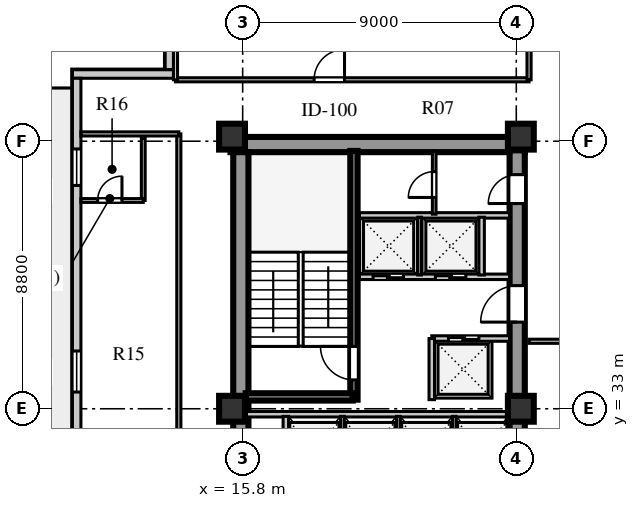
"""IFC4 building model, lengths in metres.
Left out: names, types, materials, properties, quantities, classifications, styles, units other than length and angle.
Written with IfcOpenShell. Run it as: python <this file> out.ifc"""

import sys

from ifc_helpers import new_model, si_unit, direction, frame, frame_2d, origin, origin_2d, place, context, subcontext, project, spatial, rectangle, extrude, element, fill, save


model = new_model("IFC4")
c1 = context("Model", 3, precision=1e-05, world=origin(), true_north=direction((0.0, 1.0)))
c2 = subcontext(c1, "Body", "Model", "MODEL_VIEW")
j1 = project(units=[si_unit("LENGTHUNIT", "METRE"), si_unit("PLANEANGLEUNIT", "RADIAN")], contexts=[c1])
p1 = place(None, origin())
s1 = spatial("IfcSite", under=j1, at=p1, CompositionType="ELEMENT")
p2 = place(p1, origin())
s2 = spatial("IfcBuilding", under=s1, at=p2, CompositionType="ELEMENT")
p3 = place(p2, frame((0.0, 0.0, 119.4)))
s3 = spatial("IfcBuildingStorey", under=s2, at=p3, CompositionType="ELEMENT", Elevation=119.4)
p4 = place(p3, frame((15.4, 41.69, 0.0), z_axis=(0.0, 0.0, 1.0), x_axis=(1.0, 0.0, 0.0)))
e1 = element("IfcWall", 1, at=p4, inside=s3, PredefinedType="SHEAR", context=c2, shape_type="SweptSolid", body=[
    extrude(rectangle(XDim=9.68, YDim=0.5, at=frame_2d((4.84, 0.0))), origin(), (0.0, 0.0, 1.0), 3.6),
])
p5 = place(p3, frame((15.74, 15.81, 0.0), z_axis=(0.0, 0.0, 1.0), x_axis=(0.0, 1.0, 0.0)))
e2 = element("IfcWall", 2, at=p5, inside=s3, PredefinedType="SHEAR", context=c2, shape_type="SweptSolid", body=[
    extrude(rectangle(XDim=25.63, YDim=0.5, at=frame_2d((12.815, 0.0))), origin(), (0.0, 0.0, 1.0), 3.6),
])
p6 = place(p3, frame((24.83, 15.74, 0.0), z_axis=(0.0, 0.0, 1.0), x_axis=(0.0, 1.0, 0.0)))
e3 = element("IfcWall", 3, at=p6, inside=s3, PredefinedType="SHEAR", context=c2, shape_type="SweptSolid", body=[
    extrude(rectangle(XDim=25.76, YDim=0.5, at=frame_2d((12.88, 0.0))), origin(), (0.0, 0.0, 1.0), 3.6),
])
p7 = place(p6, frame((1.61, 0.0, 0.0)))
e4 = element("IfcOpeningElement", 4, at=p7, cuts=e3, PredefinedType="OPENING", context=c2, shape_type="SweptSolid", body=[
    extrude(rectangle(XDim=1.2, YDim=2.1, at=frame_2d((0.6, 1.05))), frame((0.0, 0.26, 0.0), z_axis=(0.0, -1.0, 0.0), x_axis=(1.0, 0.0, 0.0)), (0.0, 0.0, 1.0), 0.52),
])
p8 = place(p6, frame((6.78, 0.0, 0.0)))
e5 = element("IfcOpeningElement", 5, at=p8, cuts=e3, PredefinedType="OPENING", context=c2, shape_type="SweptSolid", body=[
    extrude(rectangle(XDim=0.85, YDim=2.06, at=frame_2d((0.425, 1.03))), frame((0.0, 0.26, 0.0), z_axis=(0.0, -1.0, 0.0), x_axis=(1.0, 0.0, 0.0)), (0.0, 0.0, 1.0), 0.52),
])
p9 = place(p6, frame((12.11, 0.0, 0.0)))
e6 = element("IfcOpeningElement", 6, at=p9, cuts=e3, PredefinedType="OPENING", context=c2, shape_type="SweptSolid", body=[
    extrude(rectangle(XDim=1.5, YDim=2.12, at=frame_2d((0.75, 1.06))), frame((0.0, 0.26, 0.0), z_axis=(0.0, -1.0, 0.0), x_axis=(1.0, 0.0, 0.0)), (0.0, 0.0, 1.0), 0.52),
])
p10 = place(p6, frame((20.11, 0.0, 0.0)))
e7 = element("IfcOpeningElement", 7, at=p10, cuts=e3, PredefinedType="OPENING", context=c2, shape_type="SweptSolid", body=[
    extrude(rectangle(XDim=1.2, YDim=2.12, at=frame_2d((0.6, 1.06))), frame((0.0, 0.26, 0.0), z_axis=(0.0, -1.0, 0.0), x_axis=(1.0, 0.0, 0.0)), (0.0, 0.0, 1.0), 0.52),
])
p11 = place(p6, frame((24.01, 0.0, 0.0)))
e8 = element("IfcOpeningElement", 8, at=p11, cuts=e3, PredefinedType="OPENING", context=c2, shape_type="SweptSolid", body=[
    extrude(rectangle(XDim=0.95, YDim=2.1, at=frame_2d((0.475, 1.05))), frame((0.0, 0.26, 0.0), z_axis=(0.0, -1.0, 0.0), x_axis=(1.0, 0.0, 0.0)), (0.0, 0.0, 1.0), 0.52),
])
for number, where, z_axis, x_axis in (
    (9, (15.45, 33.0, 0.0), (0.0, 0.0, 1.0), (1.0, 0.0, 0.0)),
    (10, (15.45, 41.95, 0.0), (0.0, 0.0, 1.0), (1.0, 0.0, 0.0)),
    (11, (24.95, 33.0, 0.0), (0.0, 0.0, 1.0), (1.0, 0.0, 0.0)),
    (12, (24.95, 41.95, 0.0), (0.0, 0.0, 1.0), (1.0, 0.0, 0.0)),
):
    element("IfcColumn", number, at=place(p3, frame(where, z_axis=z_axis, x_axis=x_axis)), inside=s3, PredefinedType="COLUMN", context=c2, shape_type="SweptSolid", body=[
        extrude(rectangle(XDim=0.85, YDim=0.85, at=origin_2d()), origin(), (0.0, 0.0, 1.0), 3.6),
    ])
p12 = place(p3, frame((13.39, 46.92, 0.0), z_axis=(0.0, 0.0, 1.0), x_axis=(0.0, -1.0, 0.0)))
e13 = element("IfcWall", 13, at=p12, inside=s3, PredefinedType="STANDARD", context=c2, shape_type="SweptSolid", body=[
    extrude(rectangle(XDim=2.77, YDim=0.28, at=frame_2d((1.385, 0.0))), origin(), (0.0, 0.0, 1.0), 3.6),
])
p13 = place(p3, frame((13.53, 44.01, 0.0), z_axis=(0.0, 0.0, 1.0), x_axis=(-1.0, 0.0, 0.0)))
e14 = element("IfcWall", 14, at=p13, inside=s3, PredefinedType="STANDARD", context=c2, shape_type="SweptSolid", body=[
    extrude(rectangle(XDim=3.33, YDim=0.28, at=frame_2d((1.665, 0.0))), origin(), (0.0, 0.0, 1.0), 3.6),
])
p14 = place(p3, frame((10.34, 43.87, 0.0), z_axis=(0.0, 0.0, 1.0), x_axis=(0.0, -1.0, 0.0)))
e15 = element("IfcWall", 15, at=p14, inside=s3, PredefinedType="STANDARD", context=c2, shape_type="SweptSolid", body=[
    extrude(rectangle(XDim=30.54, YDim=0.28, at=frame_2d((15.27, 0.0))), origin(), (0.0, 0.0, 1.0), 3.6),
])
p15 = place(p14, frame((27.22, 0.0, 0.0)))
e16 = element("IfcOpeningElement", 16, at=p15, cuts=e15, PredefinedType="OPENING", context=c2, shape_type="SweptSolid", body=[
    extrude(rectangle(XDim=1.0, YDim=2.05, at=frame_2d((0.5, 1.025))), frame((0.0, 0.15, 0.0), z_axis=(0.0, -1.0, 0.0), x_axis=(1.0, 0.0, 0.0)), (0.0, 0.0, 1.0), 0.3),
])
p16 = place(p14, frame((21.08, 0.0, 0.8)))
e17 = element("IfcOpeningElement", 17, at=p16, cuts=e15, PredefinedType="OPENING", context=c2, shape_type="SweptSolid", body=[
    extrude(rectangle(XDim=2.4, YDim=2.05, at=frame_2d((1.2, 1.025))), frame((0.0, 0.15, 0.0), z_axis=(0.0, -1.0, 0.0), x_axis=(1.0, 0.0, 0.0)), (0.0, 0.0, 1.0), 0.3),
])
p17 = place(p14, frame((15.735, 0.0, 0.8)))
e18 = element("IfcOpeningElement", 18, at=p17, cuts=e15, PredefinedType="OPENING", context=c2, shape_type="SweptSolid", body=[
    extrude(rectangle(XDim=1.2, YDim=1.75, at=frame_2d((0.6, 0.875))), frame((0.0, 0.15, 0.0), z_axis=(0.0, -1.0, 0.0), x_axis=(1.0, 0.0, 0.0)), (0.0, 0.0, 1.0), 0.3),
])
p18 = place(p14, frame((8.97, 0.0, 0.8)))
e19 = element("IfcOpeningElement", 19, at=p18, cuts=e15, PredefinedType="OPENING", context=c2, shape_type="SweptSolid", body=[
    extrude(rectangle(XDim=1.35, YDim=1.9, at=frame_2d((0.675, 0.95))), frame((0.0, 0.15, 0.0), z_axis=(0.0, -1.0, 0.0), x_axis=(1.0, 0.0, 0.0)), (0.0, 0.0, 1.0), 0.3),
])
p19 = place(p14, frame((2.325, 0.0, 0.8)))
e20 = element("IfcOpeningElement", 20, at=p19, cuts=e15, PredefinedType="OPENING", context=c2, shape_type="SweptSolid", body=[
    extrude(rectangle(XDim=1.2, YDim=1.75, at=frame_2d((0.6, 0.875))), frame((0.0, 0.15, 0.0), z_axis=(0.0, -1.0, 0.0), x_axis=(1.0, 0.0, 0.0)), (0.0, 0.0, 1.0), 0.3),
])
p20 = place(p3, frame((15.9, 32.82, 0.0), z_axis=(0.0, 0.0, 1.0), x_axis=(1.0, 0.0, 0.0)))
e21 = element("IfcWall", 21, at=p20, inside=s3, PredefinedType="SOLIDWALL", context=c2, shape_type="SweptSolid", body=[
    extrude(rectangle(XDim=8.68, YDim=0.18, at=frame_2d((4.34, 0.0))), origin(), (0.0, 0.0, 1.0), 2.95),
])
p21 = place(p3, frame((17.22, 30.7, 0.0), z_axis=(0.0, 0.0, 1.0), x_axis=(0.0, 1.0, 0.0)))
e22 = element("IfcWall", 22, at=p21, inside=s3, PredefinedType="SOLIDWALL", context=c2, shape_type="SweptSolid", body=[
    extrude(rectangle(XDim=2.05, YDim=0.18, at=frame_2d((1.025, 0.0))), origin(), (0.0, 0.0, 1.0), 3.6),
])
for number, where, z_axis, x_axis in (
    (23, (19.08, 30.7, 0.0), (0.0, 0.0, 1.0), (0.0, 1.0, 0.0)),
    (24, (20.92, 30.7, 0.0), (0.0, 0.0, 1.0), (0.0, 1.0, 0.0)),
    (25, (22.76, 30.7, 0.0), (0.0, 0.0, 1.0), (0.0, 1.0, 0.0)),
):
    element("IfcWall", number, at=place(p3, frame(where, z_axis=z_axis, x_axis=x_axis)), inside=s3, PredefinedType="PARTITIONING", context=c2, shape_type="SweptSolid", body=[
        extrude(rectangle(XDim=2.05, YDim=0.12, at=frame_2d((1.025, 0.0))), origin(), (0.0, 0.0, 1.0), 3.6),
    ])
p22 = place(p3, frame((19.46, 33.3, 0.0), z_axis=(0.0, 0.0, 1.0), x_axis=(0.0, 1.0, 0.0)))
e26 = element("IfcWall", 26, at=p22, inside=s3, PredefinedType="SHEAR", context=c2, shape_type="SweptSolid", body=[
    extrude(rectangle(XDim=8.18, YDim=0.24, at=frame_2d((4.09, 0.0))), origin(), (0.0, 0.0, 1.0), 3.85),
])
p23 = place(p22, frame((0.65, 0.0, 0.0)))
e27 = element("IfcOpeningElement", 27, at=p23, cuts=e26, PredefinedType="OPENING", context=c2, shape_type="SweptSolid", body=[
    extrude(rectangle(XDim=1.1, YDim=2.1, at=frame_2d((0.55, 1.05))), frame((0.0, 0.13, 0.0), z_axis=(0.0, -1.0, 0.0), x_axis=(1.0, 0.0, 0.0)), (0.0, 0.0, 1.0), 0.26),
])
p24 = place(p3, frame((15.9, 33.39, 0.0), z_axis=(0.0, 0.0, 1.0), x_axis=(1.0, 0.0, 0.0)))
e28 = element("IfcWall", 28, at=p24, inside=s3, PredefinedType="SHEAR", context=c2, shape_type="SweptSolid", body=[
    extrude(rectangle(XDim=3.52, YDim=0.24, at=frame_2d((1.76, 0.0))), origin(), (0.0, 0.0, 1.0), 3.85),
])
p25 = place(p3, frame((22.02, 35.31, 0.0), z_axis=(0.0, 0.0, 1.0), x_axis=(1.0, 0.0, 0.0)))
e29 = element("IfcWall", 29, at=p25, inside=s3, PredefinedType="SOLIDWALL", context=c2, shape_type="SweptSolid", body=[
    extrude(rectangle(XDim=2.56, YDim=0.18, at=frame_2d((1.28, 0.0))), origin(), (0.0, 0.0, 1.0), 3.6),
])
p26 = place(p25, frame((0.55, 0.0, 0.0)))
e30 = element("IfcOpeningElement", 30, at=p26, cuts=e29, PredefinedType="OPENING", context=c2, shape_type="SweptSolid", body=[
    extrude(rectangle(XDim=1.0, YDim=2.1, at=frame_2d((0.5, 1.05))), frame((0.0, 0.1, 0.0), z_axis=(0.0, -1.0, 0.0), x_axis=(1.0, 0.0, 0.0)), (0.0, 0.0, 1.0), 0.2),
])
p27 = place(p3, frame((22.02, 33.3, 0.0), z_axis=(0.0, 0.0, 1.0), x_axis=(0.0, 1.0, 0.0)))
e31 = element("IfcWall", 31, at=p27, inside=s3, PredefinedType="SOLIDWALL", context=c2, shape_type="SweptSolid", body=[
    extrude(rectangle(XDim=2.01, YDim=0.18, at=frame_2d((1.005, 0.0))), origin(), (0.0, 0.0, 1.0), 3.6),
])
p28 = place(p3, frame((19.64, 37.34, 0.0), z_axis=(0.0, 0.0, 1.0), x_axis=(1.0, 0.0, 0.0)))
e32 = element("IfcWall", 32, at=p28, inside=s3, PredefinedType="SOLIDWALL", context=c2, shape_type="SweptSolid", body=[
    extrude(rectangle(XDim=4.94, YDim=0.18, at=frame_2d((2.47, 0.0))), origin(), (0.0, 0.0, 1.0), 3.6),
])
p29 = place(p28, frame((0.45, 0.0, 0.0)))
e33 = element("IfcOpeningElement", 33, at=p29, cuts=e32, PredefinedType="OPENING", context=c2, shape_type="SweptSolid", body=[
    extrude(rectangle(XDim=1.0, YDim=2.1, at=frame_2d((0.5, 1.05))), frame((0.0, 0.1, 0.0), z_axis=(0.0, -1.0, 0.0), x_axis=(1.0, 0.0, 0.0)), (0.0, 0.0, 1.0), 0.2),
])
p30 = place(p28, frame((2.5, 0.0, 0.0)))
e34 = element("IfcOpeningElement", 34, at=p30, cuts=e32, PredefinedType="OPENING", context=c2, shape_type="SweptSolid", body=[
    extrude(rectangle(XDim=1.0, YDim=2.1, at=frame_2d((0.5, 1.05))), frame((0.0, 0.1, 0.0), z_axis=(0.0, -1.0, 0.0), x_axis=(1.0, 0.0, 0.0)), (0.0, 0.0, 1.0), 0.2),
])
p31 = place(p3, frame((19.64, 39.36, 0.0), z_axis=(0.0, 0.0, 1.0), x_axis=(1.0, 0.0, 0.0)))
e35 = element("IfcWall", 35, at=p31, inside=s3, PredefinedType="SOLIDWALL", context=c2, shape_type="SweptSolid", body=[
    extrude(rectangle(XDim=4.94, YDim=0.18, at=frame_2d((2.47, 0.0))), origin(), (0.0, 0.0, 1.0), 3.6),
])
p32 = place(p3, frame((21.62, 37.4, 0.0), z_axis=(0.0, 0.0, 1.0), x_axis=(0.0, 1.0, 0.0)))
e36 = element("IfcWall", 36, at=p32, inside=s3, PredefinedType="PARTITIONING", context=c2, shape_type="SweptSolid", body=[
    extrude(rectangle(XDim=1.9, YDim=0.12, at=frame_2d((0.95, 0.0))), origin(), (0.0, 0.0, 1.0), 3.6),
])
p33 = place(p3, frame((23.66, 37.4, 0.0), z_axis=(0.0, 0.0, 1.0), x_axis=(0.0, 1.0, 0.0)))
e37 = element("IfcWall", 37, at=p33, inside=s3, PredefinedType="SOLIDWALL", context=c2, shape_type="SweptSolid", body=[
    extrude(rectangle(XDim=1.9, YDim=0.18, at=frame_2d((0.95, 0.0))), origin(), (0.0, 0.0, 1.0), 3.6),
])
p34 = place(p3, frame((22.1, 39.4, 0.0), z_axis=(0.0, 0.0, 1.0), x_axis=(0.0, 1.0, 0.0)))
e38 = element("IfcWall", 38, at=p34, inside=s3, PredefinedType="PARTITIONING", context=c2, shape_type="SweptSolid", body=[
    extrude(rectangle(XDim=2.08, YDim=0.12, at=frame_2d((1.04, 0.0))), origin(), (0.0, 0.0, 1.0), 3.6),
])
p35 = place(p34, frame((0.55, 0.0, 0.0)))
e39 = element("IfcOpeningElement", 39, at=p35, cuts=e38, PredefinedType="OPENING", context=c2, shape_type="SweptSolid", body=[
    extrude(rectangle(XDim=0.85, YDim=2.06, at=frame_2d((0.425, 1.03))), frame((0.0, 0.07, 0.0), z_axis=(0.0, -1.0, 0.0), x_axis=(1.0, 0.0, 0.0)), (0.0, 0.0, 1.0), 0.14),
])
p36 = place(p3, frame((25.22, 35.22, 0.0), z_axis=(0.0, 0.0, 1.0), x_axis=(1.0, 0.0, 0.0)))
e40 = element("IfcWall", 40, at=p36, inside=s3, PredefinedType="PARTITIONING", context=c2, shape_type="SweptSolid", body=[
    extrude(rectangle(XDim=9.5, YDim=0.135, at=frame_2d((4.75, 0.0))), origin(), (0.0, 0.0, 1.0), 3.6),
])
p37 = place(p36, frame((1.2, 0.0, 0.0)))
e41 = element("IfcOpeningElement", 41, at=p37, cuts=e40, PredefinedType="OPENING", context=c2, shape_type="SweptSolid", body=[
    extrude(rectangle(XDim=0.95, YDim=2.1, at=frame_2d((0.475, 1.05))), frame((0.0, 0.078, 0.0), z_axis=(0.0, -1.0, 0.0), x_axis=(1.0, 0.0, 0.0)), (0.0, 0.0, 1.0), 0.155),
])
p38 = place(p3, frame((13.7, 15.16, 0.0), z_axis=(0.0, 0.0, 1.0), x_axis=(0.0, 1.0, 0.0)))
e42 = element("IfcWall", 42, at=p38, inside=s3, PredefinedType="PARTITIONING", context=c2, shape_type="SweptSolid", body=[
    extrude(rectangle(XDim=26.88, YDim=0.135, at=frame_2d((13.44, 0.0))), origin(), (0.0, 0.0, 1.0), 3.6),
])
p39 = place(p38, frame((0.91, 0.0, 0.0)))
e43 = element("IfcOpeningElement", 43, at=p39, cuts=e42, PredefinedType="OPENING", context=c2, shape_type="SweptSolid", body=[
    extrude(rectangle(XDim=0.95, YDim=2.1, at=frame_2d((0.475, 1.05))), frame((0.0, 0.078, 0.0), z_axis=(0.0, -1.0, 0.0), x_axis=(1.0, 0.0, 0.0)), (0.0, 0.0, 1.0), 0.155),
])
p40 = place(p38, frame((13.99, 0.0, 0.0)))
e44 = element("IfcOpeningElement", 44, at=p40, cuts=e42, PredefinedType="OPENING", context=c2, shape_type="SweptSolid", body=[
    extrude(rectangle(XDim=0.95, YDim=2.1, at=frame_2d((0.475, 1.05))), frame((0.0, 0.078, 0.0), z_axis=(0.0, -1.0, 0.0), x_axis=(1.0, 0.0, 0.0)), (0.0, 0.0, 1.0), 0.155),
])
p41 = place(p3, frame((10.48, 42.04, 0.0), z_axis=(0.0, 0.0, 1.0), x_axis=(1.0, 0.0, 0.0)))
e45 = element("IfcWall", 45, at=p41, inside=s3, PredefinedType="PARTITIONING", context=c2, shape_type="SweptSolid", body=[
    extrude(rectangle(XDim=3.22, YDim=0.135, at=frame_2d((1.61, 0.0))), origin(), (0.0, 0.0, 1.0), 3.1),
])
p42 = place(p3, frame((13.59, 43.82, 0.0), z_axis=(0.0, 0.0, 1.0), x_axis=(1.0, 0.0, 0.0)))
e46 = element("IfcWall", 46, at=p42, inside=s3, PredefinedType="PARTITIONING", context=c2, shape_type="SweptSolid", body=[
    extrude(rectangle(XDim=11.63, YDim=0.135, at=frame_2d((5.815, 0.0))), origin(), (0.0, 0.0, 1.0), 3.6),
])
p43 = place(p42, frame((4.56, 0.0, 0.0)))
e47 = element("IfcOpeningElement", 47, at=p43, cuts=e46, PredefinedType="OPENING", context=c2, shape_type="SweptSolid", body=[
    extrude(rectangle(XDim=1.0, YDim=2.08, at=frame_2d((0.5, 1.04))), frame((0.0, 0.078, 0.0), z_axis=(0.0, -1.0, 0.0), x_axis=(1.0, 0.0, 0.0)), (0.0, 0.0, 1.0), 0.155),
])
p44 = place(p3, frame((13.59, 43.82, 0.0), z_axis=(0.0, 0.0, 1.0), x_axis=(0.0, 1.0, 0.0)))
e48 = element("IfcWall", 48, at=p44, inside=s3, PredefinedType="PARTITIONING", context=c2, shape_type="SweptSolid", body=[
    extrude(rectangle(XDim=3.1, YDim=0.135, at=frame_2d((1.55, 0.0))), origin(), (0.0, 0.0, 1.0), 3.6),
])
p45 = place(p3, frame((25.22, 43.82, 0.0), z_axis=(0.0, 0.0, 1.0), x_axis=(0.0, 1.0, 0.0)))
e49 = element("IfcWall", 49, at=p45, inside=s3, PredefinedType="PARTITIONING", context=c2, shape_type="SweptSolid", body=[
    extrude(rectangle(XDim=3.1, YDim=0.135, at=frame_2d((1.55, 0.0))), origin(), (0.0, 0.0, 1.0), 3.1),
])
p46 = place(p3, frame((12.53, 39.85, 0.0), z_axis=(0.0, 0.0, 1.0), x_axis=(0.0, 1.0, 0.0)))
e50 = element("IfcWall", 50, at=p46, inside=s3, PredefinedType="PLUMBINGWALL", context=c2, shape_type="SweptSolid", body=[
    extrude(rectangle(XDim=2.05, YDim=0.125, at=frame_2d((1.025, 0.0))), origin(), (0.0, 0.0, 1.0), 3.6),
])
p47 = place(p3, frame((10.48, 39.85, 0.0), z_axis=(0.0, 0.0, 1.0), x_axis=(1.0, 0.0, 0.0)))
e51 = element("IfcWall", 51, at=p47, inside=s3, PredefinedType="PLUMBINGWALL", context=c2, shape_type="SweptSolid", body=[
    extrude(rectangle(XDim=2.05, YDim=0.125, at=frame_2d((1.025, 0.0))), origin(), (0.0, 0.0, 1.0), 3.6),
])
p48 = place(p47, frame((0.55, 0.0, 0.0)))
e52 = element("IfcOpeningElement", 52, at=p48, cuts=e51, PredefinedType="OPENING", context=c2, shape_type="SweptSolid", body=[
    extrude(rectangle(XDim=0.8, YDim=2.05, at=frame_2d((0.4, 1.025))), frame((0.0, 0.073, 0.0), z_axis=(0.0, -1.0, 0.0), x_axis=(1.0, 0.0, 0.0)), (0.0, 0.0, 1.0), 0.145),
])
p49 = place(p18, origin())
e53 = element("IfcWindow", 53, at=p49, inside=s3, PartitioningType="SINGLE_PANEL", PredefinedType="WINDOW", context=c2, shape_type="SweptSolid", body=[
    extrude(rectangle(XDim=1.35, YDim=1.9, at=frame_2d((0.675, 0.95))), frame((0.0, 0.03, 0.0), z_axis=(0.0, -1.0, 0.0), x_axis=(1.0, 0.0, 0.0)), (0.0, 0.0, 1.0), 0.06),
])
fill(e19, e53)
p50 = place(p19, origin())
e54 = element("IfcWindow", 54, at=p50, inside=s3, PartitioningType="SINGLE_PANEL", PredefinedType="WINDOW", context=c2, shape_type="SweptSolid", body=[
    extrude(rectangle(XDim=1.2, YDim=1.75, at=frame_2d((0.6, 0.875))), frame((0.0, 0.03, 0.0), z_axis=(0.0, -1.0, 0.0), x_axis=(1.0, 0.0, 0.0)), (0.0, 0.0, 1.0), 0.06),
])
fill(e20, e54)
p51 = place(p23, origin())
e55 = element("IfcDoor", 55, at=p51, inside=s3, OperationType="SINGLE_SWING_RIGHT", PredefinedType="DOOR", context=c2, shape_type="SweptSolid", body=[
    extrude(rectangle(XDim=1.1, YDim=2.1, at=frame_2d((0.55, 1.05))), frame((0.0, 0.025, 0.0), z_axis=(0.0, -1.0, 0.0), x_axis=(1.0, 0.0, 0.0)), (0.0, 0.0, 1.0), 0.05),
])
fill(e27, e55)
p52 = place(p10, frame((1.2, 0.0, 0.0), z_axis=(0.0, 0.0, 1.0), x_axis=(-1.0, 0.0, 0.0)))
e56 = element("IfcDoor", 56, at=p52, inside=s3, OperationType="SINGLE_SWING_RIGHT", PredefinedType="DOOR", context=c2, shape_type="SweptSolid", body=[
    extrude(rectangle(XDim=1.2, YDim=2.12, at=frame_2d((0.6, 1.06))), frame((0.0, 0.025, 0.0), z_axis=(0.0, -1.0, 0.0), x_axis=(1.0, 0.0, 0.0)), (0.0, 0.0, 1.0), 0.05),
])
fill(e7, e56)
p53 = place(p29, frame((1.0, 0.0, 0.0), z_axis=(0.0, 0.0, 1.0), x_axis=(-1.0, 0.0, 0.0)))
e57 = element("IfcDoor", 57, at=p53, inside=s3, OperationType="DOUBLE_DOOR_SLIDING", PredefinedType="DOOR", context=c2, shape_type="SweptSolid", body=[
    extrude(rectangle(XDim=1.0, YDim=2.1, at=frame_2d((0.5, 1.05))), frame((0.0, 0.025, 0.0), z_axis=(0.0, -1.0, 0.0), x_axis=(1.0, 0.0, 0.0)), (0.0, 0.0, 1.0), 0.05),
])
fill(e33, e57)
p54 = place(p30, frame((1.0, 0.0, 0.0), z_axis=(0.0, 0.0, 1.0), x_axis=(-1.0, 0.0, 0.0)))
e58 = element("IfcDoor", 58, at=p54, inside=s3, OperationType="DOUBLE_DOOR_SLIDING", PredefinedType="DOOR", context=c2, shape_type="SweptSolid", body=[
    extrude(rectangle(XDim=1.0, YDim=2.1, at=frame_2d((0.5, 1.05))), frame((0.0, 0.025, 0.0), z_axis=(0.0, -1.0, 0.0), x_axis=(1.0, 0.0, 0.0)), (0.0, 0.0, 1.0), 0.05),
])
fill(e34, e58)
p55 = place(p26, origin())
e59 = element("IfcDoor", 59, at=p55, inside=s3, OperationType="DOUBLE_DOOR_SLIDING", PredefinedType="DOOR", context=c2, shape_type="SweptSolid", body=[
    extrude(rectangle(XDim=1.0, YDim=2.1, at=frame_2d((0.5, 1.05))), frame((0.0, 0.025, 0.0), z_axis=(0.0, -1.0, 0.0), x_axis=(1.0, 0.0, 0.0)), (0.0, 0.0, 1.0), 0.05),
])
fill(e30, e59)
p56 = place(p35, origin())
e60 = element("IfcDoor", 60, at=p56, inside=s3, OperationType="SINGLE_SWING_LEFT", PredefinedType="DOOR", context=c2, shape_type="SweptSolid", body=[
    extrude(rectangle(XDim=0.85, YDim=2.06, at=frame_2d((0.425, 1.03))), frame((0.0, 0.025, 0.0), z_axis=(0.0, -1.0, 0.0), x_axis=(1.0, 0.0, 0.0)), (0.0, 0.0, 1.0), 0.05),
])
fill(e39, e60)
p57 = place(p11, frame((0.95, 0.0, 0.0), z_axis=(0.0, 0.0, 1.0), x_axis=(-1.0, 0.0, 0.0)))
e61 = element("IfcDoor", 61, at=p57, inside=s3, OperationType="SINGLE_SWING_RIGHT", PredefinedType="DOOR", context=c2, shape_type="SweptSolid", body=[
    extrude(rectangle(XDim=0.95, YDim=2.1, at=frame_2d((0.475, 1.05))), frame((0.0, 0.025, 0.0), z_axis=(0.0, -1.0, 0.0), x_axis=(1.0, 0.0, 0.0)), (0.0, 0.0, 1.0), 0.05),
])
fill(e8, e61)
p58 = place(p43, origin())
e62 = element("IfcDoor", 62, at=p58, inside=s3, OperationType="SINGLE_SWING_RIGHT", PredefinedType="DOOR", context=c2, shape_type="SweptSolid", body=[
    extrude(rectangle(XDim=1.0, YDim=2.08, at=frame_2d((0.5, 1.04))), frame((0.0, 0.025, 0.0), z_axis=(0.0, -1.0, 0.0), x_axis=(1.0, 0.0, 0.0)), (0.0, 0.0, 1.0), 0.05),
])
fill(e47, e62)
p59 = place(p48, frame((0.8, 0.0, 0.0), z_axis=(0.0, 0.0, 1.0), x_axis=(-1.0, 0.0, 0.0)))
e63 = element("IfcDoor", 63, at=p59, inside=s3, OperationType="SINGLE_SWING_LEFT", PredefinedType="DOOR", context=c2, shape_type="SweptSolid", body=[
    extrude(rectangle(XDim=0.8, YDim=2.05, at=frame_2d((0.4, 1.025))), frame((0.0, 0.025, 0.0), z_axis=(0.0, -1.0, 0.0), x_axis=(1.0, 0.0, 0.0)), (0.0, 0.0, 1.0), 0.05),
])
fill(e52, e63)
save(model, sys.argv[1])
